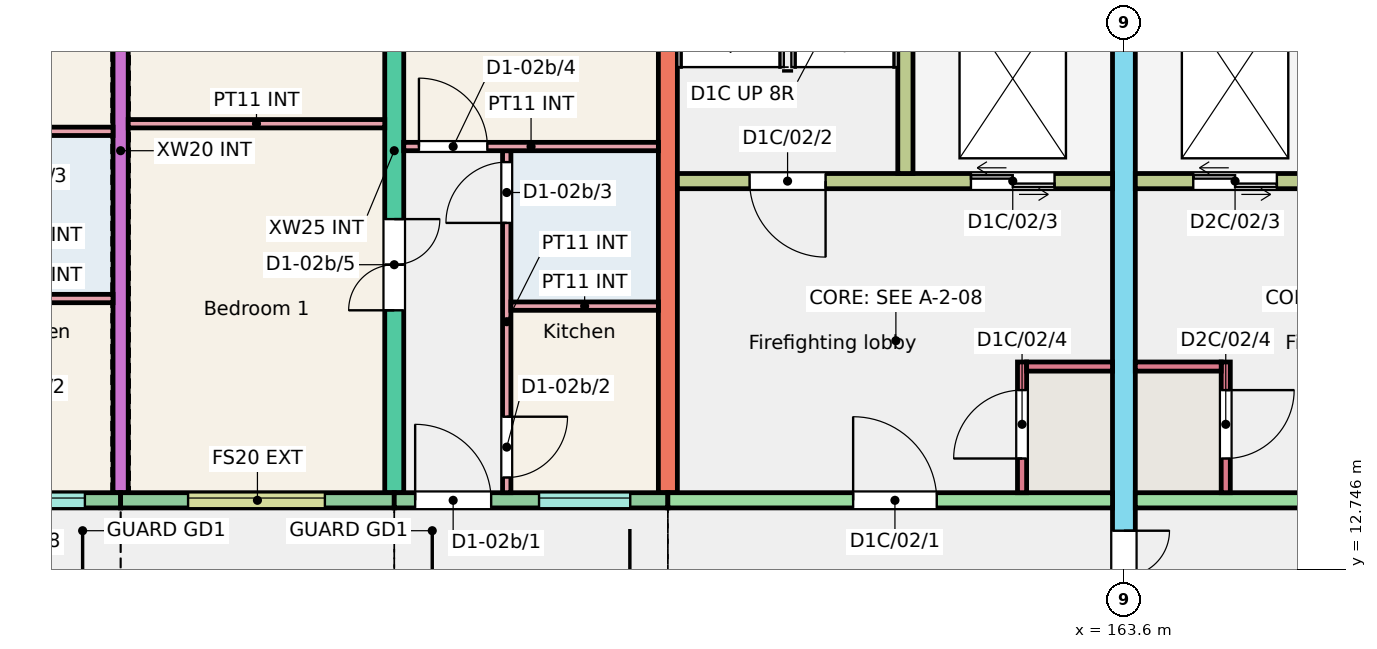
"""IFC4 building model, lengths in metres.
Left out: names, types, materials, properties, quantities, classifications, styles, units other than length and angle.
Written with IfcOpenShell. Run it as: python <this file> out.ifc"""

import sys

from ifc_helpers import new_model, si_unit, direction, frame, frame_2d, origin, place, context, subcontext, project, spatial, rectangle, extrude, element, fill, save


model = new_model("IFC4")
c1 = context("Model", 3, precision=1e-05, world=origin(), true_north=direction((0.0, 1.0)))
c2 = subcontext(c1, "Body", "Model", "MODEL_VIEW")
j1 = project(units=[si_unit("LENGTHUNIT", "METRE"), si_unit("PLANEANGLEUNIT", "RADIAN")], contexts=[c1])
p1 = place(None, origin())
s1 = spatial("IfcSite", under=j1, at=p1, CompositionType="ELEMENT")
p2 = place(p1, origin())
s2 = spatial("IfcBuilding", under=s1, at=p2, CompositionType="ELEMENT")
p3 = place(p2, frame((0.0, 0.0, 6.0)))
s3 = spatial("IfcBuildingStorey", under=s2, at=p3, CompositionType="ELEMENT", Elevation=6.0)
p4 = place(p3, frame((150.4, 13.75, 0.0), z_axis=(0.0, 0.0, 1.0), x_axis=(0.0, 1.0, 0.0)))
e1 = element("IfcWall", 1, at=p4, inside=s3, PredefinedType="SHEAR", context=c2, shape_type="SweptSolid", body=[
    extrude(rectangle(XDim=9.0, YDim=0.2, at=frame_2d((4.5, 0.0))), origin(), (0.0, 0.0, 1.0), 3.0),
])
p5 = place(p3, frame((154.0, 13.75, 0.0), z_axis=(0.0, 0.0, 1.0), x_axis=(0.0, 1.0, 0.0)))
e2 = element("IfcWall", 2, at=p5, inside=s3, PredefinedType="SHEAR", context=c2, shape_type="SweptSolid", body=[
    extrude(rectangle(XDim=9.0, YDim=0.25, at=frame_2d((4.5, 0.0))), origin(), (0.0, 0.0, 1.0), 3.0),
])
p6 = place(p5, frame((2.4, 0.0, 0.0)))
e3 = element("IfcOpeningElement", 3, at=p6, cuts=e2, PredefinedType="OPENING", context=c2, shape_type="SweptSolid", body=[
    extrude(rectangle(XDim=1.2, YDim=2.1, at=frame_2d((0.6, 1.05))), frame((0.0, 0.135, 0.0), z_axis=(0.0, -1.0, 0.0), x_axis=(1.0, 0.0, 0.0)), (0.0, 0.0, 1.0), 0.27),
])
p7 = place(p5, frame((6.4, 0.0, 0.0)))
e4 = element("IfcOpeningElement", 4, at=p7, cuts=e2, PredefinedType="OPENING", context=c2, shape_type="SweptSolid", body=[
    extrude(rectangle(XDim=1.2, YDim=2.1, at=frame_2d((0.6, 1.05))), frame((0.0, 0.135, 0.0), z_axis=(0.0, -1.0, 0.0), x_axis=(1.0, 0.0, 0.0)), (0.0, 0.0, 1.0), 0.27),
])
p8 = place(p3, frame((157.6, 13.75, 0.0), z_axis=(0.0, 0.0, 1.0), x_axis=(0.0, 1.0, 0.0)))
e5 = element("IfcWall", 5, at=p8, inside=s3, PredefinedType="SHEAR", context=c2, shape_type="SweptSolid", body=[
    extrude(rectangle(XDim=9.0, YDim=0.25, at=frame_2d((4.5, 0.0))), origin(), (0.0, 0.0, 1.0), 3.0),
])
p9 = place(p3, frame((163.6, 11.75, 0.0), z_axis=(0.0, 0.0, 1.0), x_axis=(0.0, 1.0, 0.0)))
e6 = element("IfcWall", 6, at=p9, inside=s3, PredefinedType="SHEAR", context=c2, shape_type="SweptSolid", body=[
    extrude(rectangle(XDim=11.0, YDim=0.3, at=frame_2d((5.5, 0.0))), origin(), (0.0, 0.0, 1.0), 3.0),
])
p10 = place(p9, frame((0.3, 0.0, 0.0)))
e7 = element("IfcOpeningElement", 7, at=p10, cuts=e6, PredefinedType="OPENING", context=c2, shape_type="SweptSolid", body=[
    extrude(rectangle(XDim=1.2, YDim=2.1, at=frame_2d((0.6, 1.05))), frame((0.0, 0.16, 0.0), z_axis=(0.0, -1.0, 0.0), x_axis=(1.0, 0.0, 0.0)), (0.0, 0.0, 1.0), 0.32),
])
p11 = place(p3, frame((146.95, 13.65, 0.0), z_axis=(0.0, 0.0, 1.0), x_axis=(1.0, 0.0, 0.0)))
e8 = element("IfcWall", 8, at=p11, inside=s3, PredefinedType="SOLIDWALL", context=c2, shape_type="SweptSolid", body=[
    extrude(rectangle(XDim=3.45, YDim=0.2, at=frame_2d((1.725, 0.0))), origin(), (0.0, 0.0, 1.0), 3.0),
])
p12 = place(p11, frame((1.78, 0.0, 1.1)))
e9 = element("IfcOpeningElement", 9, at=p12, cuts=e8, PredefinedType="OPENING", context=c2, shape_type="SweptSolid", body=[
    extrude(rectangle(XDim=1.2, YDim=1.3, at=frame_2d((0.6, 0.65))), frame((0.0, 0.11, 0.0), z_axis=(0.0, -1.0, 0.0), x_axis=(1.0, 0.0, 0.0)), (0.0, 0.0, 1.0), 0.22),
])
p13 = place(p11, frame((0.15, 0.0, 0.0)))
e10 = element("IfcOpeningElement", 10, at=p13, cuts=e8, PredefinedType="OPENING", context=c2, shape_type="SweptSolid", body=[
    extrude(rectangle(XDim=1.0, YDim=2.1, at=frame_2d((0.5, 1.05))), frame((0.0, 0.11, 0.0), z_axis=(0.0, -1.0, 0.0), x_axis=(1.0, 0.0, 0.0)), (0.0, 0.0, 1.0), 0.22),
])
p14 = place(p3, frame((150.4, 13.65, 0.0), z_axis=(0.0, 0.0, 1.0), x_axis=(1.0, 0.0, 0.0)))
e11 = element("IfcWall", 11, at=p14, inside=s3, PredefinedType="SOLIDWALL", context=c2, shape_type="SweptSolid", body=[
    extrude(rectangle(XDim=3.6, YDim=0.2, at=frame_2d((1.8, 0.0))), origin(), (0.0, 0.0, 1.0), 3.0),
])
p15 = place(p14, frame((0.887, 0.0, 1.1)))
e12 = element("IfcOpeningElement", 12, at=p15, cuts=e11, PredefinedType="OPENING", context=c2, shape_type="SweptSolid", body=[
    extrude(rectangle(XDim=1.8, YDim=1.3, at=frame_2d((0.9, 0.65))), frame((0.0, 0.11, 0.0), z_axis=(0.0, -1.0, 0.0), x_axis=(1.0, 0.0, 0.0)), (0.0, 0.0, 1.0), 0.22),
])
p16 = place(p3, frame((154.0, 13.65, 0.0), z_axis=(0.0, 0.0, 1.0), x_axis=(1.0, 0.0, 0.0)))
e13 = element("IfcWall", 13, at=p16, inside=s3, PredefinedType="SOLIDWALL", context=c2, shape_type="SweptSolid", body=[
    extrude(rectangle(XDim=3.6, YDim=0.2, at=frame_2d((1.8, 0.0))), origin(), (0.0, 0.0, 1.0), 3.0),
])
p17 = place(p16, frame((1.905, 0.0, 1.1)))
e14 = element("IfcOpeningElement", 14, at=p17, cuts=e13, PredefinedType="OPENING", context=c2, shape_type="SweptSolid", body=[
    extrude(rectangle(XDim=1.2, YDim=1.3, at=frame_2d((0.6, 0.65))), frame((0.0, 0.11, 0.0), z_axis=(0.0, -1.0, 0.0), x_axis=(1.0, 0.0, 0.0)), (0.0, 0.0, 1.0), 0.22),
])
p18 = place(p16, frame((0.275, 0.0, 0.0)))
e15 = element("IfcOpeningElement", 15, at=p18, cuts=e13, PredefinedType="OPENING", context=c2, shape_type="SweptSolid", body=[
    extrude(rectangle(XDim=1.0, YDim=2.1, at=frame_2d((0.5, 1.05))), frame((0.0, 0.11, 0.0), z_axis=(0.0, -1.0, 0.0), x_axis=(1.0, 0.0, 0.0)), (0.0, 0.0, 1.0), 0.22),
])
p19 = place(p3, frame((157.6, 13.65, 0.0), z_axis=(0.0, 0.0, 1.0), x_axis=(1.0, 0.0, 0.0)))
e16 = element("IfcWall", 16, at=p19, inside=s3, PredefinedType="SHEAR", context=c2, shape_type="SweptSolid", body=[
    extrude(rectangle(XDim=5.85, YDim=0.2, at=frame_2d((2.925, 0.0))), origin(), (0.0, 0.0, 1.0), 3.0),
])
p20 = place(p19, frame((2.438, 0.0, 0.0)))
e17 = element("IfcOpeningElement", 17, at=p20, cuts=e16, PredefinedType="OPENING", context=c2, shape_type="SweptSolid", body=[
    extrude(rectangle(XDim=1.1, YDim=2.1, at=frame_2d((0.55, 1.05))), frame((0.0, 0.11, 0.0), z_axis=(0.0, -1.0, 0.0), x_axis=(1.0, 0.0, 0.0)), (0.0, 0.0, 1.0), 0.22),
])
p21 = place(p3, frame((157.725, 17.85, 0.0), z_axis=(0.0, 0.0, 1.0), x_axis=(1.0, 0.0, 0.0)))
e18 = element("IfcWall", 18, at=p21, inside=s3, PredefinedType="SHEAR", context=c2, shape_type="SweptSolid", body=[
    extrude(rectangle(XDim=5.725, YDim=0.2, at=frame_2d((2.862, 0.0))), origin(), (0.0, 0.0, 1.0), 3.0),
])
p22 = place(p21, frame((0.95, 0.0, 0.0)))
e19 = element("IfcOpeningElement", 19, at=p22, cuts=e18, PredefinedType="OPENING", context=c2, shape_type="SweptSolid", body=[
    extrude(rectangle(XDim=1.0, YDim=2.1, at=frame_2d((0.5, 1.05))), frame((0.0, 0.11, 0.0), z_axis=(0.0, -1.0, 0.0), x_axis=(1.0, 0.0, 0.0)), (0.0, 0.0, 1.0), 0.22),
])
p23 = place(p21, frame((3.863, 0.0, 0.0)))
e20 = element("IfcOpeningElement", 20, at=p23, cuts=e18, PredefinedType="OPENING", context=c2, shape_type="SweptSolid", body=[
    extrude(rectangle(XDim=1.1, YDim=2.1, at=frame_2d((0.55, 1.05))), frame((0.0, 0.11, 0.0), z_axis=(0.0, -1.0, 0.0), x_axis=(1.0, 0.0, 0.0)), (0.0, 0.0, 1.0), 0.22),
])
p24 = place(p3, frame((160.725, 17.95, 0.0), z_axis=(0.0, 0.0, 1.0), x_axis=(0.0, 1.0, 0.0)))
e21 = element("IfcWall", 21, at=p24, inside=s3, PredefinedType="SHEAR", context=c2, shape_type="SweptSolid", body=[
    extrude(rectangle(XDim=4.8, YDim=0.2, at=frame_2d((2.4, 0.0))), origin(), (0.0, 0.0, 1.0), 3.0),
])
p25 = place(p3, frame((162.26, 13.75, 0.0), z_axis=(0.0, 0.0, 1.0), x_axis=(0.0, 1.0, 0.0)))
e22 = element("IfcWall", 22, at=p25, inside=s3, PredefinedType="SHEAR", context=c2, shape_type="SweptSolid", body=[
    extrude(rectangle(XDim=1.72, YDim=0.12, at=frame_2d((0.86, 0.0))), origin(), (0.0, 0.0, 1.0), 3.0),
])
p26 = place(p25, frame((0.45, 0.0, 0.0)))
e23 = element("IfcOpeningElement", 23, at=p26, cuts=e22, PredefinedType="OPENING", context=c2, shape_type="SweptSolid", body=[
    extrude(rectangle(XDim=0.9, YDim=2.1, at=frame_2d((0.45, 1.05))), frame((0.0, 0.07, 0.0), z_axis=(0.0, -1.0, 0.0), x_axis=(1.0, 0.0, 0.0)), (0.0, 0.0, 1.0), 0.14),
])
p27 = place(p3, frame((162.32, 15.41, 0.0), z_axis=(0.0, 0.0, 1.0), x_axis=(1.0, 0.0, 0.0)))
e24 = element("IfcWall", 24, at=p27, inside=s3, PredefinedType="SHEAR", context=c2, shape_type="SweptSolid", body=[
    extrude(rectangle(XDim=1.13, YDim=0.12, at=frame_2d((0.565, 0.0))), origin(), (0.0, 0.0, 1.0), 3.0),
])
p28 = place(p3, frame((163.75, 13.65, 0.0), z_axis=(0.0, 0.0, 1.0), x_axis=(1.0, 0.0, 0.0)))
e25 = element("IfcWall", 25, at=p28, inside=s3, PredefinedType="SHEAR", context=c2, shape_type="SweptSolid", body=[
    extrude(rectangle(XDim=5.85, YDim=0.2, at=frame_2d((2.925, 0.0))), origin(), (0.0, 0.0, 1.0), 3.0),
])
p29 = place(p28, frame((2.312, 0.0, 0.0)))
e26 = element("IfcOpeningElement", 26, at=p29, cuts=e25, PredefinedType="OPENING", context=c2, shape_type="SweptSolid", body=[
    extrude(rectangle(XDim=1.1, YDim=2.1, at=frame_2d((0.55, 1.05))), frame((0.0, 0.11, 0.0), z_axis=(0.0, -1.0, 0.0), x_axis=(1.0, 0.0, 0.0)), (0.0, 0.0, 1.0), 0.22),
])
p30 = place(p3, frame((163.75, 17.85, 0.0), z_axis=(0.0, 0.0, 1.0), x_axis=(1.0, 0.0, 0.0)))
e27 = element("IfcWall", 27, at=p30, inside=s3, PredefinedType="SHEAR", context=c2, shape_type="SweptSolid", body=[
    extrude(rectangle(XDim=5.725, YDim=0.2, at=frame_2d((2.863, 0.0))), origin(), (0.0, 0.0, 1.0), 3.0),
])
p31 = place(p30, frame((3.775, 0.0, 0.0)))
e28 = element("IfcOpeningElement", 28, at=p31, cuts=e27, PredefinedType="OPENING", context=c2, shape_type="SweptSolid", body=[
    extrude(rectangle(XDim=1.0, YDim=2.1, at=frame_2d((0.5, 1.05))), frame((0.0, 0.11, 0.0), z_axis=(0.0, -1.0, 0.0), x_axis=(1.0, 0.0, 0.0)), (0.0, 0.0, 1.0), 0.22),
])
p32 = place(p30, frame((0.762, 0.0, 0.0)))
e29 = element("IfcOpeningElement", 29, at=p32, cuts=e27, PredefinedType="OPENING", context=c2, shape_type="SweptSolid", body=[
    extrude(rectangle(XDim=1.1, YDim=2.1, at=frame_2d((0.55, 1.05))), frame((0.0, 0.11, 0.0), z_axis=(0.0, -1.0, 0.0), x_axis=(1.0, 0.0, 0.0)), (0.0, 0.0, 1.0), 0.22),
])
p33 = place(p3, frame((164.94, 13.75, 0.0), z_axis=(0.0, 0.0, 1.0), x_axis=(0.0, 1.0, 0.0)))
e30 = element("IfcWall", 30, at=p33, inside=s3, PredefinedType="SHEAR", context=c2, shape_type="SweptSolid", body=[
    extrude(rectangle(XDim=1.72, YDim=0.12, at=frame_2d((0.86, 0.0))), origin(), (0.0, 0.0, 1.0), 3.0),
])
p34 = place(p33, frame((0.45, 0.0, 0.0)))
e31 = element("IfcOpeningElement", 31, at=p34, cuts=e30, PredefinedType="OPENING", context=c2, shape_type="SweptSolid", body=[
    extrude(rectangle(XDim=0.9, YDim=2.1, at=frame_2d((0.45, 1.05))), frame((0.0, 0.07, 0.0), z_axis=(0.0, -1.0, 0.0), x_axis=(1.0, 0.0, 0.0)), (0.0, 0.0, 1.0), 0.14),
])
p35 = place(p3, frame((163.75, 15.41, 0.0), z_axis=(0.0, 0.0, 1.0), x_axis=(1.0, 0.0, 0.0)))
e32 = element("IfcWall", 32, at=p35, inside=s3, PredefinedType="SHEAR", context=c2, shape_type="SweptSolid", body=[
    extrude(rectangle(XDim=1.13, YDim=0.12, at=frame_2d((0.565, 0.0))), origin(), (0.0, 0.0, 1.0), 3.0),
])
p36 = place(p3, frame((148.36, 16.305, 0.0), z_axis=(0.0, 0.0, 1.0), x_axis=(1.0, 0.0, 0.0)))
e33 = element("IfcWall", 33, at=p36, inside=s3, PredefinedType="PARTITIONING", context=c2, shape_type="SweptSolid", body=[
    extrude(rectangle(XDim=1.94, YDim=0.11, at=frame_2d((0.97, 0.0))), origin(), (0.0, 0.0, 1.0), 2.8),
])
p37 = place(p3, frame((146.95, 18.505, 0.0), z_axis=(0.0, 0.0, 1.0), x_axis=(1.0, 0.0, 0.0)))
e34 = element("IfcWall", 34, at=p37, inside=s3, PredefinedType="PARTITIONING", context=c2, shape_type="SweptSolid", body=[
    extrude(rectangle(XDim=3.35, YDim=0.11, at=frame_2d((1.675, 0.0))), origin(), (0.0, 0.0, 1.0), 2.8),
])
p38 = place(p37, frame((0.2, 0.0, 0.0)))
e35 = element("IfcOpeningElement", 35, at=p38, cuts=e34, PredefinedType="OPENING", context=c2, shape_type="SweptSolid", body=[
    extrude(rectangle(XDim=0.9, YDim=2.1, at=frame_2d((0.45, 1.05))), frame((0.0, 0.065, 0.0), z_axis=(0.0, -1.0, 0.0), x_axis=(1.0, 0.0, 0.0)), (0.0, 0.0, 1.0), 0.13),
])
p39 = place(p3, frame((155.48, 13.75, 0.0), z_axis=(0.0, 0.0, 1.0), x_axis=(0.0, 1.0, 0.0)))
e36 = element("IfcWall", 36, at=p39, inside=s3, PredefinedType="PARTITIONING", context=c2, shape_type="SweptSolid", body=[
    extrude(rectangle(XDim=4.5, YDim=0.11, at=frame_2d((2.25, 0.0))), origin(), (0.0, 0.0, 1.0), 2.8),
])
p40 = place(p39, frame((0.2, 0.0, 0.0)))
e37 = element("IfcOpeningElement", 37, at=p40, cuts=e36, PredefinedType="OPENING", context=c2, shape_type="SweptSolid", body=[
    extrude(rectangle(XDim=0.8, YDim=2.1, at=frame_2d((0.4, 1.05))), frame((0.0, 0.065, 0.0), z_axis=(0.0, -1.0, 0.0), x_axis=(1.0, 0.0, 0.0)), (0.0, 0.0, 1.0), 0.13),
])
p41 = place(p39, frame((3.55, 0.0, 0.0)))
e38 = element("IfcOpeningElement", 38, at=p41, cuts=e36, PredefinedType="OPENING", context=c2, shape_type="SweptSolid", body=[
    extrude(rectangle(XDim=0.8, YDim=2.1, at=frame_2d((0.4, 1.05))), frame((0.0, 0.065, 0.0), z_axis=(0.0, -1.0, 0.0), x_axis=(1.0, 0.0, 0.0)), (0.0, 0.0, 1.0), 0.13),
])
p42 = place(p3, frame((155.535, 16.205, 0.0), z_axis=(0.0, 0.0, 1.0), x_axis=(1.0, 0.0, 0.0)))
e39 = element("IfcWall", 39, at=p42, inside=s3, PredefinedType="PARTITIONING", context=c2, shape_type="SweptSolid", body=[
    extrude(rectangle(XDim=1.94, YDim=0.11, at=frame_2d((0.97, 0.0))), origin(), (0.0, 0.0, 1.0), 2.8),
])
p43 = place(p3, frame((154.125, 18.305, 0.0), z_axis=(0.0, 0.0, 1.0), x_axis=(1.0, 0.0, 0.0)))
e40 = element("IfcWall", 40, at=p43, inside=s3, PredefinedType="PARTITIONING", context=c2, shape_type="SweptSolid", body=[
    extrude(rectangle(XDim=3.35, YDim=0.11, at=frame_2d((1.675, 0.0))), origin(), (0.0, 0.0, 1.0), 2.8),
])
p44 = place(p43, frame((0.2, 0.0, 0.0)))
e41 = element("IfcOpeningElement", 41, at=p44, cuts=e40, PredefinedType="OPENING", context=c2, shape_type="SweptSolid", body=[
    extrude(rectangle(XDim=0.9, YDim=2.1, at=frame_2d((0.45, 1.05))), frame((0.0, 0.065, 0.0), z_axis=(0.0, -1.0, 0.0), x_axis=(1.0, 0.0, 0.0)), (0.0, 0.0, 1.0), 0.13),
])
p45 = place(p3, frame((150.5, 18.605, 0.0), z_axis=(0.0, 0.0, 1.0), x_axis=(1.0, 0.0, 0.0)))
e42 = element("IfcWall", 42, at=p45, inside=s3, PredefinedType="PARTITIONING", context=c2, shape_type="SweptSolid", body=[
    extrude(rectangle(XDim=3.375, YDim=0.11, at=frame_2d((1.688, 0.0))), origin(), (0.0, 0.0, 1.0), 2.8),
])
p46 = place(p12, origin())
e43 = element("IfcWindow", 43, at=p46, inside=s3, PartitioningType="SINGLE_PANEL", PredefinedType="WINDOW", context=c2, shape_type="SweptSolid", body=[
    extrude(rectangle(XDim=1.2, YDim=1.3, at=frame_2d((0.6, 0.65))), frame((0.0, 0.06, 0.0), z_axis=(0.0, -1.0, 0.0), x_axis=(1.0, 0.0, 0.0)), (0.0, 0.0, 1.0), 0.06),
])
fill(e9, e43)
p47 = place(p15, origin())
e44 = element("IfcWindow", 44, at=p47, inside=s3, PartitioningType="SINGLE_PANEL", PredefinedType="WINDOW", context=c2, shape_type="SweptSolid", body=[
    extrude(rectangle(XDim=1.8, YDim=1.3, at=frame_2d((0.9, 0.65))), frame((0.0, 0.06, 0.0), z_axis=(0.0, -1.0, 0.0), x_axis=(1.0, 0.0, 0.0)), (0.0, 0.0, 1.0), 0.06),
])
fill(e12, e44)
p48 = place(p17, origin())
e45 = element("IfcWindow", 45, at=p48, inside=s3, PartitioningType="SINGLE_PANEL", PredefinedType="WINDOW", context=c2, shape_type="SweptSolid", body=[
    extrude(rectangle(XDim=1.2, YDim=1.3, at=frame_2d((0.6, 0.65))), frame((0.0, 0.06, 0.0), z_axis=(0.0, -1.0, 0.0), x_axis=(1.0, 0.0, 0.0)), (0.0, 0.0, 1.0), 0.06),
])
fill(e14, e45)
p49 = place(p18, origin())
e46 = element("IfcDoor", 46, at=p49, inside=s3, OperationType="SINGLE_SWING_LEFT", PredefinedType="DOOR", context=c2, shape_type="SweptSolid", body=[
    extrude(rectangle(XDim=1.0, YDim=2.1, at=frame_2d((0.5, 1.05))), frame((0.0, 0.025, 0.0), z_axis=(0.0, -1.0, 0.0), x_axis=(1.0, 0.0, 0.0)), (0.0, 0.0, 1.0), 0.05),
])
fill(e15, e46)
p50 = place(p40, origin())
e47 = element("IfcDoor", 47, at=p50, inside=s3, OperationType="SINGLE_SWING_RIGHT", PredefinedType="DOOR", context=c2, shape_type="SweptSolid", body=[
    extrude(rectangle(XDim=0.8, YDim=2.1, at=frame_2d((0.4, 1.05))), frame((0.0, 0.025, 0.0), z_axis=(0.0, -1.0, 0.0), x_axis=(1.0, 0.0, 0.0)), (0.0, 0.0, 1.0), 0.05),
])
fill(e37, e47)
p51 = place(p41, origin())
e48 = element("IfcDoor", 48, at=p51, inside=s3, OperationType="SINGLE_SWING_LEFT", PredefinedType="DOOR", context=c2, shape_type="SweptSolid", body=[
    extrude(rectangle(XDim=0.8, YDim=2.1, at=frame_2d((0.4, 1.05))), frame((0.0, 0.025, 0.0), z_axis=(0.0, -1.0, 0.0), x_axis=(1.0, 0.0, 0.0)), (0.0, 0.0, 1.0), 0.05),
])
fill(e38, e48)
p52 = place(p44, origin())
e49 = element("IfcDoor", 49, at=p52, inside=s3, OperationType="SINGLE_SWING_LEFT", PredefinedType="DOOR", context=c2, shape_type="SweptSolid", body=[
    extrude(rectangle(XDim=0.9, YDim=2.1, at=frame_2d((0.45, 1.05))), frame((0.0, 0.025, 0.0), z_axis=(0.0, -1.0, 0.0), x_axis=(1.0, 0.0, 0.0)), (0.0, 0.0, 1.0), 0.05),
])
fill(e41, e49)
p53 = place(p6, origin())
e50 = element("IfcDoor", 50, at=p53, inside=s3, OperationType="DOUBLE_DOOR_SINGLE_SWING", PredefinedType="DOOR", context=c2, shape_type="SweptSolid", body=[
    extrude(rectangle(XDim=1.2, YDim=2.1, at=frame_2d((0.6, 1.05))), frame((0.0, 0.025, 0.0), z_axis=(0.0, -1.0, 0.0), x_axis=(1.0, 0.0, 0.0)), (0.0, 0.0, 1.0), 0.05),
])
fill(e3, e50)
p54 = place(p20, origin())
e51 = element("IfcDoor", 51, at=p54, inside=s3, OperationType="SINGLE_SWING_LEFT", PredefinedType="DOOR", context=c2, shape_type="SweptSolid", body=[
    extrude(rectangle(XDim=1.1, YDim=2.1, at=frame_2d((0.55, 1.05))), frame((0.0, 0.025, 0.0), z_axis=(0.0, -1.0, 0.0), x_axis=(1.0, 0.0, 0.0)), (0.0, 0.0, 1.0), 0.05),
])
fill(e17, e51)
p55 = place(p22, origin())
e52 = element("IfcDoor", 52, at=p55, inside=s3, OperationType="SINGLE_SWING_RIGHT", PredefinedType="DOOR", context=c2, shape_type="SweptSolid", body=[
    extrude(rectangle(XDim=1.0, YDim=2.1, at=frame_2d((0.5, 1.05))), frame((0.0, 0.025, 0.0), z_axis=(0.0, -1.0, 0.0), x_axis=(1.0, 0.0, 0.0)), (0.0, 0.0, 1.0), 0.05),
])
fill(e19, e52)
p56 = place(p23, origin())
e53 = element("IfcDoor", 53, at=p56, inside=s3, OperationType="DOUBLE_DOOR_SLIDING", PredefinedType="DOOR", context=c2, shape_type="SweptSolid", body=[
    extrude(rectangle(XDim=1.1, YDim=2.1, at=frame_2d((0.55, 1.05))), frame((0.0, 0.025, 0.0), z_axis=(0.0, -1.0, 0.0), x_axis=(1.0, 0.0, 0.0)), (0.0, 0.0, 1.0), 0.05),
])
fill(e20, e53)
p57 = place(p26, origin())
e54 = element("IfcDoor", 54, at=p57, inside=s3, OperationType="SINGLE_SWING_LEFT", PredefinedType="DOOR", context=c2, shape_type="SweptSolid", body=[
    extrude(rectangle(XDim=0.9, YDim=2.1, at=frame_2d((0.45, 1.05))), frame((0.0, 0.025, 0.0), z_axis=(0.0, -1.0, 0.0), x_axis=(1.0, 0.0, 0.0)), (0.0, 0.0, 1.0), 0.05),
])
fill(e23, e54)
p58 = place(p32, origin())
e55 = element("IfcDoor", 55, at=p58, inside=s3, OperationType="DOUBLE_DOOR_SLIDING", PredefinedType="DOOR", context=c2, shape_type="SweptSolid", body=[
    extrude(rectangle(XDim=1.1, YDim=2.1, at=frame_2d((0.55, 1.05))), frame((0.0, 0.025, 0.0), z_axis=(0.0, -1.0, 0.0), x_axis=(1.0, 0.0, 0.0)), (0.0, 0.0, 1.0), 0.05),
])
fill(e29, e55)
p59 = place(p34, origin())
e56 = element("IfcDoor", 56, at=p59, inside=s3, OperationType="SINGLE_SWING_RIGHT", PredefinedType="DOOR", context=c2, shape_type="SweptSolid", body=[
    extrude(rectangle(XDim=0.9, YDim=2.1, at=frame_2d((0.45, 1.05))), frame((0.0, 0.025, 0.0), z_axis=(0.0, -1.0, 0.0), x_axis=(1.0, 0.0, 0.0)), (0.0, 0.0, 1.0), 0.05),
])
fill(e31, e56)
p60 = place(p10, origin())
e57 = element("IfcDoor", 57, at=p60, inside=s3, OperationType="DOUBLE_DOOR_SINGLE_SWING", PredefinedType="DOOR", context=c2, shape_type="SweptSolid", body=[
    extrude(rectangle(XDim=1.2, YDim=2.1, at=frame_2d((0.6, 1.05))), frame((0.0, 0.025, 0.0), z_axis=(0.0, -1.0, 0.0), x_axis=(1.0, 0.0, 0.0)), (0.0, 0.0, 1.0), 0.05),
])
fill(e7, e57)
save(model, sys.argv[1])
